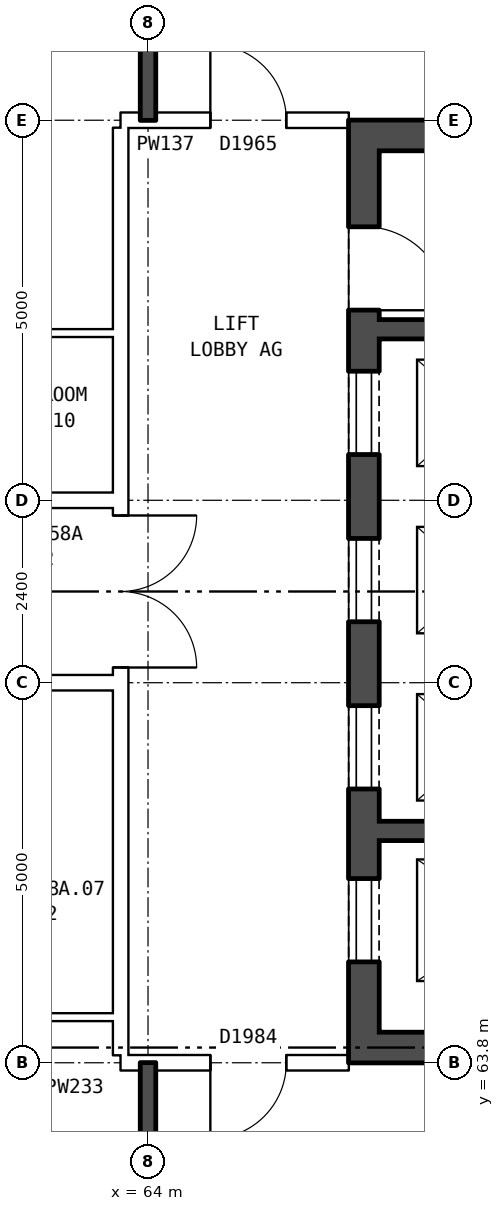
"""IFC4 building model, lengths in metres.
Left out: names, types, materials, properties, quantities, classifications, styles, units other than length and angle.
Written with IfcOpenShell. Run it as: python <this file> out.ifc"""

import sys

from ifc_helpers import new_model, si_unit, direction, frame, frame_2d, origin, place, context, subcontext, project, spatial, rectangle, extrude, element, fill, save


model = new_model("IFC4")
c1 = context("Model", 3, precision=1e-05, world=origin(), true_north=direction((0.0, 1.0)))
c2 = subcontext(c1, "Body", "Model", "MODEL_VIEW")
j1 = project(units=[si_unit("LENGTHUNIT", "METRE"), si_unit("PLANEANGLEUNIT", "RADIAN")], contexts=[c1])
p1 = place(None, origin())
s1 = spatial("IfcSite", under=j1, at=p1, CompositionType="ELEMENT")
p2 = place(p1, origin())
s2 = spatial("IfcBuilding", under=s1, at=p2, CompositionType="ELEMENT")
p3 = place(p2, frame((0.0, 0.0, 205.9)))
s3 = spatial("IfcBuildingStorey", under=s2, at=p3, CompositionType="ELEMENT", Elevation=205.9)
p4 = place(p3, frame((66.84, 63.8, 0.0), z_axis=(0.0, 0.0, 1.0), x_axis=(0.0, 1.0, 0.0)))
e1 = element("IfcWall", 1, at=p4, inside=s3, PredefinedType="SHEAR", context=c2, shape_type="SweptSolid", body=[
    extrude(rectangle(XDim=12.4, YDim=0.4, at=frame_2d((6.2, 0.0))), origin(), (0.0, 0.0, 1.0), 2.85),
])
p5 = place(p4, frame((1.325, 0.0, 0.0)))
e2 = element("IfcOpeningElement", 2, at=p5, cuts=e1, PredefinedType="OPENING", context=c2, shape_type="SweptSolid", body=[
    extrude(rectangle(XDim=1.1, YDim=2.1, at=frame_2d((0.55, 1.05))), frame((0.0, 0.21, 0.0), z_axis=(0.0, -1.0, 0.0), x_axis=(1.0, 0.0, 0.0)), (0.0, 0.0, 1.0), 0.42),
])
p6 = place(p4, frame((3.6, 0.0, 0.0)))
e3 = element("IfcOpeningElement", 3, at=p6, cuts=e1, PredefinedType="OPENING", context=c2, shape_type="SweptSolid", body=[
    extrude(rectangle(XDim=1.1, YDim=2.1, at=frame_2d((0.55, 1.05))), frame((0.0, 0.21, 0.0), z_axis=(0.0, -1.0, 0.0), x_axis=(1.0, 0.0, 0.0)), (0.0, 0.0, 1.0), 0.42),
])
p7 = place(p4, frame((5.8, 0.0, 0.0)))
e4 = element("IfcOpeningElement", 4, at=p7, cuts=e1, PredefinedType="OPENING", context=c2, shape_type="SweptSolid", body=[
    extrude(rectangle(XDim=1.1, YDim=2.1, at=frame_2d((0.55, 1.05))), frame((0.0, 0.21, 0.0), z_axis=(0.0, -1.0, 0.0), x_axis=(1.0, 0.0, 0.0)), (0.0, 0.0, 1.0), 0.42),
])
p8 = place(p4, frame((8.0, 0.0, 0.0)))
e5 = element("IfcOpeningElement", 5, at=p8, cuts=e1, PredefinedType="OPENING", context=c2, shape_type="SweptSolid", body=[
    extrude(rectangle(XDim=1.1, YDim=2.1, at=frame_2d((0.55, 1.05))), frame((0.0, 0.21, 0.0), z_axis=(0.0, -1.0, 0.0), x_axis=(1.0, 0.0, 0.0)), (0.0, 0.0, 1.0), 0.42),
])
p9 = place(p4, frame((9.9, 0.0, 0.0)))
e6 = element("IfcOpeningElement", 6, at=p9, cuts=e1, PredefinedType="OPENING", context=c2, shape_type="SweptSolid", body=[
    extrude(rectangle(XDim=1.1, YDim=2.1, at=frame_2d((0.55, 1.05))), frame((0.0, 0.21, 0.0), z_axis=(0.0, -1.0, 0.0), x_axis=(1.0, 0.0, 0.0)), (0.0, 0.0, 1.0), 0.42),
])
for number, where, z_axis, x_axis in (
    (7, (67.04, 64.0, 0.0), (0.0, 0.0, 1.0), (1.0, 0.0, 0.0)),
    (8, (67.04, 76.0, 0.0), (0.0, 0.0, 1.0), (1.0, 0.0, 0.0)),
):
    element("IfcWall", number, at=place(p3, frame(where, z_axis=z_axis, x_axis=x_axis)), inside=s3, PredefinedType="SHEAR", context=c2, shape_type="SweptSolid", body=[
        extrude(rectangle(XDim=8.2, YDim=0.4, at=frame_2d((4.1, 0.0))), origin(), (0.0, 0.0, 1.0), 2.85),
    ])
p10 = place(p3, frame((67.04, 66.85, 0.0), z_axis=(0.0, 0.0, 1.0), x_axis=(1.0, 0.0, 0.0)))
e9 = element("IfcWall", 9, at=p10, inside=s3, PredefinedType="SHEAR", context=c2, shape_type="SweptSolid", body=[
    extrude(rectangle(XDim=3.595, YDim=0.25, at=frame_2d((1.797, 0.0))), origin(), (0.0, 0.0, 1.0), 2.85),
])
p11 = place(p3, frame((67.04, 73.45, 0.0), z_axis=(0.0, 0.0, 1.0), x_axis=(1.0, 0.0, 0.0)))
e10 = element("IfcWall", 10, at=p11, inside=s3, PredefinedType="SHEAR", context=c2, shape_type="SweptSolid", body=[
    extrude(rectangle(XDim=2.525, YDim=0.25, at=frame_2d((1.262, 0.0))), origin(), (0.0, 0.0, 1.0), 2.85),
])
p12 = place(p3, frame((63.64, 63.9, 0.0), z_axis=(0.0, 0.0, 1.0), x_axis=(0.0, 1.0, 0.0)))
e11 = element("IfcWall", 11, at=p12, inside=s3, PredefinedType="PARTITIONING", context=c2, shape_type="SweptSolid", body=[
    extrude(rectangle(XDim=12.2, YDim=0.2, at=frame_2d((6.1, 0.0))), origin(), (0.0, 0.0, 1.0), 2.85),
])
p13 = place(p12, frame((5.1, 0.0, 0.0)))
e12 = element("IfcOpeningElement", 12, at=p13, cuts=e11, PredefinedType="OPENING", context=c2, shape_type="SweptSolid", body=[
    extrude(rectangle(XDim=2.0, YDim=2.1, at=frame_2d((1.0, 1.05))), frame((0.0, 0.11, 0.0), z_axis=(0.0, -1.0, 0.0), x_axis=(1.0, 0.0, 0.0)), (0.0, 0.0, 1.0), 0.22),
])
p14 = place(p3, frame((63.64, 63.8, 0.0), z_axis=(0.0, 0.0, 1.0), x_axis=(1.0, 0.0, 0.0)))
e13 = element("IfcWall", 13, at=p14, inside=s3, PredefinedType="PARTITIONING", context=c2, shape_type="SweptSolid", body=[
    extrude(rectangle(XDim=3.0, YDim=0.2, at=frame_2d((1.5, 0.0))), origin(), (0.0, 0.0, 1.0), 2.85),
])
p15 = place(p14, frame((1.18, 0.0, 0.0)))
e14 = element("IfcOpeningElement", 14, at=p15, cuts=e13, PredefinedType="OPENING", context=c2, shape_type="SweptSolid", body=[
    extrude(rectangle(XDim=1.0, YDim=2.1, at=frame_2d((0.5, 1.05))), frame((0.0, 0.11, 0.0), z_axis=(0.0, -1.0, 0.0), x_axis=(1.0, 0.0, 0.0)), (0.0, 0.0, 1.0), 0.22),
])
p16 = place(p3, frame((61.0, 64.4, 0.0), z_axis=(0.0, 0.0, 1.0), x_axis=(1.0, 0.0, 0.0)))
e15 = element("IfcWall", 15, at=p16, inside=s3, PredefinedType="PARTITIONING", context=c2, shape_type="SweptSolid", body=[
    extrude(rectangle(XDim=2.64, YDim=0.1, at=frame_2d((1.32, 0.0))), origin(), (0.0, 0.0, 1.0), 2.85),
])
p17 = place(p3, frame((44.36, 68.8, 0.0), z_axis=(0.0, 0.0, 1.0), x_axis=(1.0, 0.0, 0.0)))
e16 = element("IfcWall", 16, at=p17, inside=s3, PredefinedType="PARTITIONING", context=c2, shape_type="SweptSolid", body=[
    extrude(rectangle(XDim=19.28, YDim=0.2, at=frame_2d((9.64, 0.0))), origin(), (0.0, 0.0, 1.0), 2.85),
])
p18 = place(p17, frame((14.64, 0.0, 0.0)))
e17 = element("IfcOpeningElement", 17, at=p18, cuts=e16, PredefinedType="OPENING", context=c2, shape_type="SweptSolid", body=[
    extrude(rectangle(XDim=1.0, YDim=2.1, at=frame_2d((0.5, 1.05))), frame((0.0, 0.11, 0.0), z_axis=(0.0, -1.0, 0.0), x_axis=(1.0, 0.0, 0.0)), (0.0, 0.0, 1.0), 0.22),
])
p19 = place(p17, frame((8.64, 0.0, 0.0)))
e18 = element("IfcOpeningElement", 18, at=p19, cuts=e16, PredefinedType="OPENING", context=c2, shape_type="SweptSolid", body=[
    extrude(rectangle(XDim=1.0, YDim=2.1, at=frame_2d((0.5, 1.05))), frame((0.0, 0.11, 0.0), z_axis=(0.0, -1.0, 0.0), x_axis=(1.0, 0.0, 0.0)), (0.0, 0.0, 1.0), 0.22),
])
p20 = place(p17, frame((2.64, 0.0, 0.0)))
e19 = element("IfcOpeningElement", 19, at=p20, cuts=e16, PredefinedType="OPENING", context=c2, shape_type="SweptSolid", body=[
    extrude(rectangle(XDim=1.0, YDim=2.1, at=frame_2d((0.5, 1.05))), frame((0.0, 0.11, 0.0), z_axis=(0.0, -1.0, 0.0), x_axis=(1.0, 0.0, 0.0)), (0.0, 0.0, 1.0), 0.22),
])
p21 = place(p3, frame((44.36, 71.2, 0.0), z_axis=(0.0, 0.0, 1.0), x_axis=(1.0, 0.0, 0.0)))
e20 = element("IfcWall", 20, at=p21, inside=s3, PredefinedType="PARTITIONING", context=c2, shape_type="SweptSolid", body=[
    extrude(rectangle(XDim=19.28, YDim=0.2, at=frame_2d((9.64, 0.0))), origin(), (0.0, 0.0, 1.0), 2.85),
])
p22 = place(p21, frame((14.64, 0.0, 0.0)))
e21 = element("IfcOpeningElement", 21, at=p22, cuts=e20, PredefinedType="OPENING", context=c2, shape_type="SweptSolid", body=[
    extrude(rectangle(XDim=1.0, YDim=2.1, at=frame_2d((0.5, 1.05))), frame((0.0, 0.11, 0.0), z_axis=(0.0, -1.0, 0.0), x_axis=(1.0, 0.0, 0.0)), (0.0, 0.0, 1.0), 0.22),
])
p23 = place(p21, frame((5.64, 0.0, 0.0)))
e22 = element("IfcOpeningElement", 22, at=p23, cuts=e20, PredefinedType="OPENING", context=c2, shape_type="SweptSolid", body=[
    extrude(rectangle(XDim=1.0, YDim=2.1, at=frame_2d((0.5, 1.05))), frame((0.0, 0.11, 0.0), z_axis=(0.0, -1.0, 0.0), x_axis=(1.0, 0.0, 0.0)), (0.0, 0.0, 1.0), 0.22),
])
p24 = place(p3, frame((61.0, 73.4, 0.0), z_axis=(0.0, 0.0, 1.0), x_axis=(1.0, 0.0, 0.0)))
e23 = element("IfcWall", 23, at=p24, inside=s3, PredefinedType="PARTITIONING", context=c2, shape_type="SweptSolid", body=[
    extrude(rectangle(XDim=2.64, YDim=0.1, at=frame_2d((1.32, 0.0))), origin(), (0.0, 0.0, 1.0), 2.85),
])
p25 = place(p3, frame((63.64, 76.2, 0.0), z_axis=(0.0, 0.0, 1.0), x_axis=(1.0, 0.0, 0.0)))
e24 = element("IfcWall", 24, at=p25, inside=s3, PredefinedType="PARTITIONING", context=c2, shape_type="SweptSolid", body=[
    extrude(rectangle(XDim=3.0, YDim=0.2, at=frame_2d((1.5, 0.0))), origin(), (0.0, 0.0, 1.0), 2.85),
])
p26 = place(p25, frame((1.18, 0.0, 0.0)))
e25 = element("IfcOpeningElement", 25, at=p26, cuts=e24, PredefinedType="OPENING", context=c2, shape_type="SweptSolid", body=[
    extrude(rectangle(XDim=1.0, YDim=2.1, at=frame_2d((0.5, 1.05))), frame((0.0, 0.11, 0.0), z_axis=(0.0, -1.0, 0.0), x_axis=(1.0, 0.0, 0.0)), (0.0, 0.0, 1.0), 0.22),
])
for number, where, z_axis, x_axis in (
    (26, (64.0, 54.36, 0.0), (0.0, 0.0, 1.0), (0.0, 1.0, 0.0)),
    (27, (64.0, 76.2, 0.0), (0.0, 0.0, 1.0), (0.0, 1.0, 0.0)),
):
    element("IfcWall", number, at=place(p3, frame(where, z_axis=z_axis, x_axis=x_axis)), inside=s3, PredefinedType="SOLIDWALL", context=c2, shape_type="SweptSolid", body=[
        extrude(rectangle(XDim=9.44, YDim=0.2, at=frame_2d((4.72, 0.0))), origin(), (0.0, 0.0, 1.0), 2.85),
    ])
p27 = place(p5, origin())
e28 = element("IfcDoor", 28, at=p27, inside=s3, OperationType="DOUBLE_DOOR_SLIDING", PredefinedType="DOOR", context=c2, shape_type="SweptSolid", body=[
    extrude(rectangle(XDim=1.1, YDim=2.1, at=frame_2d((0.55, 1.05))), frame((0.0, -0.135, 0.0), z_axis=(0.0, -1.0, 0.0), x_axis=(1.0, 0.0, 0.0)), (0.0, 0.0, 1.0), 0.05),
])
fill(e2, e28)
p28 = place(p6, origin())
e29 = element("IfcDoor", 29, at=p28, inside=s3, OperationType="DOUBLE_DOOR_SLIDING", PredefinedType="DOOR", context=c2, shape_type="SweptSolid", body=[
    extrude(rectangle(XDim=1.1, YDim=2.1, at=frame_2d((0.55, 1.05))), frame((0.0, -0.135, 0.0), z_axis=(0.0, -1.0, 0.0), x_axis=(1.0, 0.0, 0.0)), (0.0, 0.0, 1.0), 0.05),
])
fill(e3, e29)
p29 = place(p7, origin())
e30 = element("IfcDoor", 30, at=p29, inside=s3, OperationType="DOUBLE_DOOR_SLIDING", PredefinedType="DOOR", context=c2, shape_type="SweptSolid", body=[
    extrude(rectangle(XDim=1.1, YDim=2.1, at=frame_2d((0.55, 1.05))), frame((0.0, -0.135, 0.0), z_axis=(0.0, -1.0, 0.0), x_axis=(1.0, 0.0, 0.0)), (0.0, 0.0, 1.0), 0.05),
])
fill(e4, e30)
p30 = place(p8, origin())
e31 = element("IfcDoor", 31, at=p30, inside=s3, OperationType="DOUBLE_DOOR_SLIDING", PredefinedType="DOOR", context=c2, shape_type="SweptSolid", body=[
    extrude(rectangle(XDim=1.1, YDim=2.1, at=frame_2d((0.55, 1.05))), frame((0.0, -0.135, 0.0), z_axis=(0.0, -1.0, 0.0), x_axis=(1.0, 0.0, 0.0)), (0.0, 0.0, 1.0), 0.05),
])
fill(e5, e31)
p31 = place(p9, frame((1.1, 0.0, 0.0), z_axis=(0.0, 0.0, 1.0), x_axis=(-1.0, 0.0, 0.0)))
e32 = element("IfcDoor", 32, at=p31, inside=s3, OperationType="SINGLE_SWING_RIGHT", PredefinedType="DOOR", context=c2, shape_type="SweptSolid", body=[
    extrude(rectangle(XDim=1.1, YDim=2.1, at=frame_2d((0.55, 1.05))), frame((0.0, 0.185, 0.0), z_axis=(0.0, -1.0, 0.0), x_axis=(1.0, 0.0, 0.0)), (0.0, 0.0, 1.0), 0.05),
])
fill(e6, e32)
p32 = place(p13, frame((2.0, 0.0, 0.0), z_axis=(0.0, 0.0, 1.0), x_axis=(-1.0, 0.0, 0.0)))
e33 = element("IfcDoor", 33, at=p32, inside=s3, OperationType="DOUBLE_DOOR_SINGLE_SWING", PredefinedType="DOOR", context=c2, shape_type="SweptSolid", body=[
    extrude(rectangle(XDim=2.0, YDim=2.1, at=frame_2d((1.0, 1.05))), frame((0.0, 0.025, 0.0), z_axis=(0.0, -1.0, 0.0), x_axis=(1.0, 0.0, 0.0)), (0.0, 0.0, 1.0), 0.05),
])
fill(e12, e33)
p33 = place(p15, frame((1.0, 0.0, 0.0), z_axis=(0.0, 0.0, 1.0), x_axis=(-1.0, 0.0, 0.0)))
e34 = element("IfcDoor", 34, at=p33, inside=s3, OperationType="SINGLE_SWING_RIGHT", PredefinedType="DOOR", context=c2, shape_type="SweptSolid", body=[
    extrude(rectangle(XDim=1.0, YDim=2.1, at=frame_2d((0.5, 1.05))), frame((0.0, 0.025, 0.0), z_axis=(0.0, -1.0, 0.0), x_axis=(1.0, 0.0, 0.0)), (0.0, 0.0, 1.0), 0.05),
])
fill(e14, e34)
p34 = place(p26, origin())
e35 = element("IfcDoor", 35, at=p34, inside=s3, OperationType="SINGLE_SWING_LEFT", PredefinedType="DOOR", context=c2, shape_type="SweptSolid", body=[
    extrude(rectangle(XDim=1.0, YDim=2.1, at=frame_2d((0.5, 1.05))), frame((0.0, 0.025, 0.0), z_axis=(0.0, -1.0, 0.0), x_axis=(1.0, 0.0, 0.0)), (0.0, 0.0, 1.0), 0.05),
])
fill(e25, e35)
save(model, sys.argv[1])
